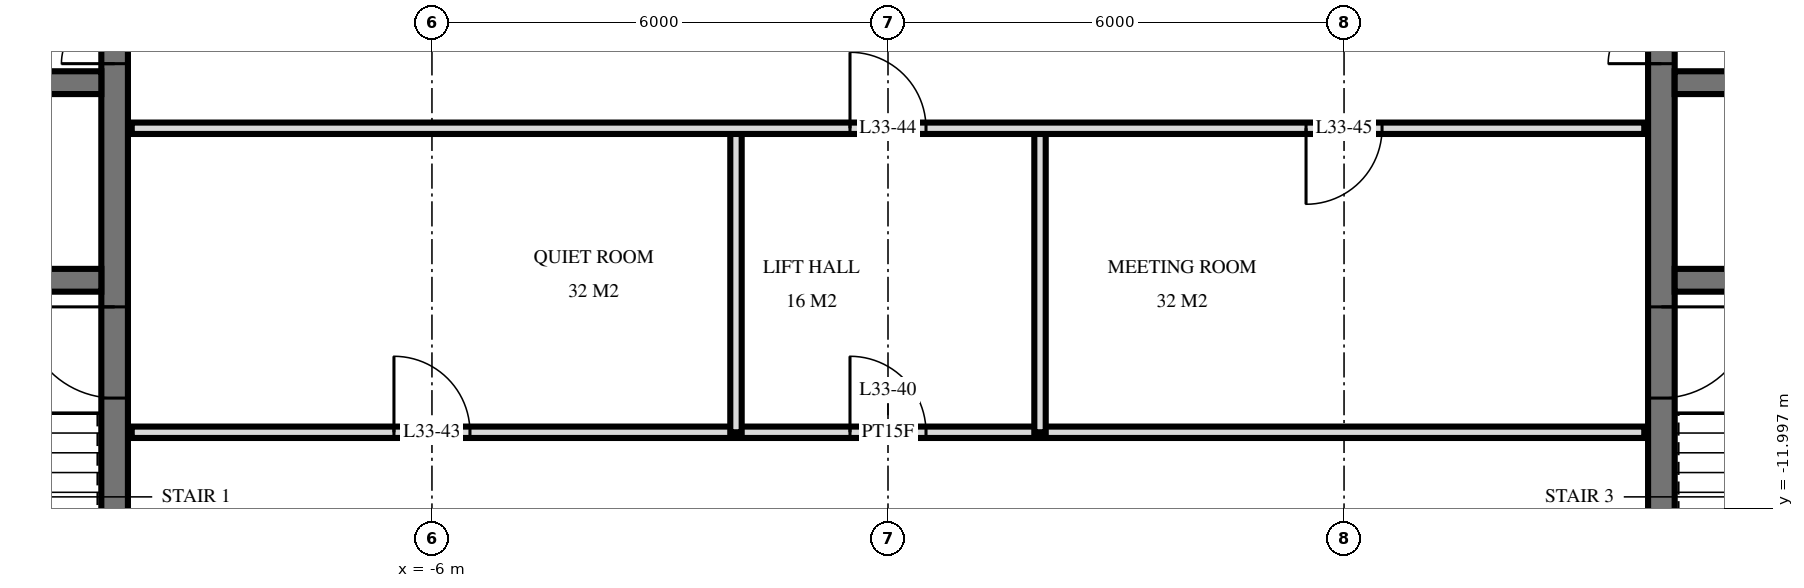
"""IFC4 building model, lengths in metres.
Left out: names, types, materials, properties, quantities, classifications, styles, units other than length and angle.
Written with IfcOpenShell. Run it as: python <this file> out.ifc"""

import sys

from ifc_helpers import new_model, si_unit, direction, frame, frame_2d, origin, place, context, subcontext, project, spatial, rectangle, extrude, element, fill, save


model = new_model("IFC4")
c1 = context("Model", 3, precision=1e-05, world=origin(), true_north=direction((0.0, 1.0)))
c2 = subcontext(c1, "Body", "Model", "MODEL_VIEW")
j1 = project(units=[si_unit("LENGTHUNIT", "METRE"), si_unit("PLANEANGLEUNIT", "RADIAN")], contexts=[c1])
p1 = place(None, origin())
s1 = spatial("IfcSite", under=j1, at=p1, CompositionType="ELEMENT")
p2 = place(p1, origin())
s2 = spatial("IfcBuilding", under=s1, at=p2, CompositionType="ELEMENT")
p3 = place(p2, frame((0.0, 0.0, 130.8)))
s3 = spatial("IfcBuildingStorey", under=s2, at=p3, CompositionType="ELEMENT", Elevation=130.8)
p4 = place(p3, frame((-10.175, -14.55, 0.0), z_axis=(0.0, 0.0, 1.0), x_axis=(0.0, 1.0, 0.0)))
e1 = element("IfcWall", 1, at=p4, inside=s3, PredefinedType="SHEAR", context=c2, shape_type="SweptSolid", body=[
    extrude(rectangle(XDim=14.1, YDim=0.35, at=frame_2d((7.05, 0.0))), origin(), (0.0, 0.0, 1.0), 3.6),
])
p5 = place(p4, frame((8.4, 0.0, 0.0)))
e2 = element("IfcOpeningElement", 2, at=p5, cuts=e1, PredefinedType="OPENING", context=c2, shape_type="SweptSolid", body=[
    extrude(rectangle(XDim=1.4, YDim=2.4, at=frame_2d((0.7, 1.2))), frame((0.0, 0.185, 0.0), z_axis=(0.0, -1.0, 0.0), x_axis=(1.0, 0.0, 0.0)), (0.0, 0.0, 1.0), 0.37),
])
p6 = place(p4, frame((10.0, 0.0, 0.0)))
e3 = element("IfcOpeningElement", 3, at=p6, cuts=e1, PredefinedType="OPENING", context=c2, shape_type="SweptSolid", body=[
    extrude(rectangle(XDim=1.4, YDim=2.4, at=frame_2d((0.7, 1.2))), frame((0.0, 0.185, 0.0), z_axis=(0.0, -1.0, 0.0), x_axis=(1.0, 0.0, 0.0)), (0.0, 0.0, 1.0), 0.37),
])
p7 = place(p4, frame((4.0, 0.0, 0.0)))
e4 = element("IfcOpeningElement", 4, at=p7, cuts=e1, PredefinedType="OPENING", context=c2, shape_type="SweptSolid", body=[
    extrude(rectangle(XDim=1.2, YDim=2.1, at=frame_2d((0.6, 1.05))), frame((0.0, 0.185, 0.0), z_axis=(0.0, -1.0, 0.0), x_axis=(1.0, 0.0, 0.0)), (0.0, 0.0, 1.0), 0.37),
])
p8 = place(p3, frame((-24.05, -6.4, 0.0), z_axis=(0.0, 0.0, 1.0), x_axis=(1.0, 0.0, 0.0)))
e5 = element("IfcWall", 5, at=p8, inside=s3, PredefinedType="SHEAR", context=c2, shape_type="SweptSolid", body=[
    extrude(rectangle(XDim=13.7, YDim=0.3, at=frame_2d((6.85, 0.0))), origin(), (0.0, 0.0, 1.0), 3.6),
])
p9 = place(p8, frame((0.55, 0.0, 0.0)))
e6 = element("IfcOpeningElement", 6, at=p9, cuts=e5, PredefinedType="OPENING", context=c2, shape_type="SweptSolid", body=[
    extrude(rectangle(XDim=1.1, YDim=2.1, at=frame_2d((0.55, 1.05))), frame((0.0, 0.16, 0.0), z_axis=(0.0, -1.0, 0.0), x_axis=(1.0, 0.0, 0.0)), (0.0, 0.0, 1.0), 0.32),
])
p10 = place(p8, frame((5.8, 0.0, 0.0)))
e7 = element("IfcOpeningElement", 7, at=p10, cuts=e5, PredefinedType="OPENING", context=c2, shape_type="SweptSolid", body=[
    extrude(rectangle(XDim=1.1, YDim=2.1, at=frame_2d((0.55, 1.05))), frame((0.0, 0.16, 0.0), z_axis=(0.0, -1.0, 0.0), x_axis=(1.0, 0.0, 0.0)), (0.0, 0.0, 1.0), 0.32),
])
p11 = place(p3, frame((-24.05, -9.0, 0.0), z_axis=(0.0, 0.0, 1.0), x_axis=(1.0, 0.0, 0.0)))
e8 = element("IfcWall", 8, at=p11, inside=s3, PredefinedType="SHEAR", context=c2, shape_type="SweptSolid", body=[
    extrude(rectangle(XDim=13.7, YDim=0.3, at=frame_2d((6.85, 0.0))), origin(), (0.0, 0.0, 1.0), 3.6),
])
p12 = place(p11, frame((8.8, 0.0, 0.0)))
e9 = element("IfcOpeningElement", 9, at=p12, cuts=e8, PredefinedType="OPENING", context=c2, shape_type="SweptSolid", body=[
    extrude(rectangle(XDim=1.1, YDim=2.1, at=frame_2d((0.55, 1.05))), frame((0.0, 0.16, 0.0), z_axis=(0.0, -1.0, 0.0), x_axis=(1.0, 0.0, 0.0)), (0.0, 0.0, 1.0), 0.32),
])
p13 = place(p3, frame((10.175, -14.55, 0.0), z_axis=(0.0, 0.0, 1.0), x_axis=(0.0, 1.0, 0.0)))
e10 = element("IfcWall", 10, at=p13, inside=s3, PredefinedType="SHEAR", context=c2, shape_type="SweptSolid", body=[
    extrude(rectangle(XDim=14.1, YDim=0.35, at=frame_2d((7.05, 0.0))), origin(), (0.0, 0.0, 1.0), 3.6),
])
p14 = place(p13, frame((8.4, 0.0, 0.0)))
e11 = element("IfcOpeningElement", 11, at=p14, cuts=e10, PredefinedType="OPENING", context=c2, shape_type="SweptSolid", body=[
    extrude(rectangle(XDim=1.4, YDim=2.4, at=frame_2d((0.7, 1.2))), frame((0.0, 0.185, 0.0), z_axis=(0.0, -1.0, 0.0), x_axis=(1.0, 0.0, 0.0)), (0.0, 0.0, 1.0), 0.37),
])
p15 = place(p13, frame((10.0, 0.0, 0.0)))
e12 = element("IfcOpeningElement", 12, at=p15, cuts=e10, PredefinedType="OPENING", context=c2, shape_type="SweptSolid", body=[
    extrude(rectangle(XDim=1.4, YDim=2.4, at=frame_2d((0.7, 1.2))), frame((0.0, 0.185, 0.0), z_axis=(0.0, -1.0, 0.0), x_axis=(1.0, 0.0, 0.0)), (0.0, 0.0, 1.0), 0.37),
])
p16 = place(p13, frame((4.0, 0.0, 0.0)))
e13 = element("IfcOpeningElement", 13, at=p16, cuts=e10, PredefinedType="OPENING", context=c2, shape_type="SweptSolid", body=[
    extrude(rectangle(XDim=1.2, YDim=2.1, at=frame_2d((0.6, 1.05))), frame((0.0, 0.185, 0.0), z_axis=(0.0, -1.0, 0.0), x_axis=(1.0, 0.0, 0.0)), (0.0, 0.0, 1.0), 0.37),
])
p17 = place(p3, frame((10.35, -6.4, 0.0), z_axis=(0.0, 0.0, 1.0), x_axis=(1.0, 0.0, 0.0)))
e14 = element("IfcWall", 14, at=p17, inside=s3, PredefinedType="SHEAR", context=c2, shape_type="SweptSolid", body=[
    extrude(rectangle(XDim=13.7, YDim=0.3, at=frame_2d((6.85, 0.0))), origin(), (0.0, 0.0, 1.0), 3.6),
])
p18 = place(p17, frame((12.05, 0.0, 0.0)))
e15 = element("IfcOpeningElement", 15, at=p18, cuts=e14, PredefinedType="OPENING", context=c2, shape_type="SweptSolid", body=[
    extrude(rectangle(XDim=1.1, YDim=2.1, at=frame_2d((0.55, 1.05))), frame((0.0, 0.16, 0.0), z_axis=(0.0, -1.0, 0.0), x_axis=(1.0, 0.0, 0.0)), (0.0, 0.0, 1.0), 0.32),
])
p19 = place(p17, frame((6.8, 0.0, 0.0)))
e16 = element("IfcOpeningElement", 16, at=p19, cuts=e14, PredefinedType="OPENING", context=c2, shape_type="SweptSolid", body=[
    extrude(rectangle(XDim=1.1, YDim=2.1, at=frame_2d((0.55, 1.05))), frame((0.0, 0.16, 0.0), z_axis=(0.0, -1.0, 0.0), x_axis=(1.0, 0.0, 0.0)), (0.0, 0.0, 1.0), 0.32),
])
p20 = place(p3, frame((10.35, -9.0, 0.0), z_axis=(0.0, 0.0, 1.0), x_axis=(1.0, 0.0, 0.0)))
e17 = element("IfcWall", 17, at=p20, inside=s3, PredefinedType="SHEAR", context=c2, shape_type="SweptSolid", body=[
    extrude(rectangle(XDim=13.7, YDim=0.3, at=frame_2d((6.85, 0.0))), origin(), (0.0, 0.0, 1.0), 3.6),
])
p21 = place(p20, frame((3.8, 0.0, 0.0)))
e18 = element("IfcOpeningElement", 18, at=p21, cuts=e17, PredefinedType="OPENING", context=c2, shape_type="SweptSolid", body=[
    extrude(rectangle(XDim=1.1, YDim=2.1, at=frame_2d((0.55, 1.05))), frame((0.0, 0.16, 0.0), z_axis=(0.0, -1.0, 0.0), x_axis=(1.0, 0.0, 0.0)), (0.0, 0.0, 1.0), 0.32),
])
for number, where, z_axis, x_axis in (
    (19, (2.0, -11.0, 0.0), (0.0, 0.0, 1.0), (0.0, 1.0, 0.0)),
    (20, (-2.0, -11.0, 0.0), (0.0, 0.0, 1.0), (0.0, 1.0, 0.0)),
):
    element("IfcWall", number, at=place(p3, frame(where, z_axis=z_axis, x_axis=x_axis)), inside=s3, PredefinedType="PARTITIONING", context=c2, shape_type="SweptSolid", body=[
        extrude(rectangle(XDim=4.0, YDim=0.15, at=frame_2d((2.0, 0.0))), origin(), (0.0, 0.0, 1.0), 3.32),
    ])
p22 = place(p3, frame((-9.95, -11.0, 0.0), z_axis=(0.0, 0.0, 1.0), x_axis=(1.0, 0.0, 0.0)))
e21 = element("IfcWall", 21, at=p22, inside=s3, PredefinedType="PARTITIONING", context=c2, shape_type="SweptSolid", body=[
    extrude(rectangle(XDim=19.9, YDim=0.15, at=frame_2d((9.95, 0.0))), origin(), (0.0, 0.0, 1.0), 3.32),
])
p23 = place(p22, frame((9.45, 0.0, 0.0)))
e22 = element("IfcOpeningElement", 22, at=p23, cuts=e21, PredefinedType="OPENING", context=c2, shape_type="SweptSolid", body=[
    extrude(rectangle(XDim=1.0, YDim=2.1, at=frame_2d((0.5, 1.05))), frame((0.0, 0.085, 0.0), z_axis=(0.0, -1.0, 0.0), x_axis=(1.0, 0.0, 0.0)), (0.0, 0.0, 1.0), 0.17),
])
p24 = place(p22, frame((3.45, 0.0, 0.0)))
e23 = element("IfcOpeningElement", 23, at=p24, cuts=e21, PredefinedType="OPENING", context=c2, shape_type="SweptSolid", body=[
    extrude(rectangle(XDim=1.0, YDim=2.1, at=frame_2d((0.5, 1.05))), frame((0.0, 0.085, 0.0), z_axis=(0.0, -1.0, 0.0), x_axis=(1.0, 0.0, 0.0)), (0.0, 0.0, 1.0), 0.17),
])
p25 = place(p3, frame((-9.95, -7.0, 0.0), z_axis=(0.0, 0.0, 1.0), x_axis=(1.0, 0.0, 0.0)))
e24 = element("IfcWall", 24, at=p25, inside=s3, PredefinedType="PARTITIONING", context=c2, shape_type="SweptSolid", body=[
    extrude(rectangle(XDim=19.9, YDim=0.15, at=frame_2d((9.95, 0.0))), origin(), (0.0, 0.0, 1.0), 3.32),
])
p26 = place(p25, frame((9.45, 0.0, 0.0)))
e25 = element("IfcOpeningElement", 25, at=p26, cuts=e24, PredefinedType="OPENING", context=c2, shape_type="SweptSolid", body=[
    extrude(rectangle(XDim=1.0, YDim=2.1, at=frame_2d((0.5, 1.05))), frame((0.0, 0.085, 0.0), z_axis=(0.0, -1.0, 0.0), x_axis=(1.0, 0.0, 0.0)), (0.0, 0.0, 1.0), 0.17),
])
p27 = place(p25, frame((15.45, 0.0, 0.0)))
e26 = element("IfcOpeningElement", 26, at=p27, cuts=e24, PredefinedType="OPENING", context=c2, shape_type="SweptSolid", body=[
    extrude(rectangle(XDim=1.0, YDim=2.1, at=frame_2d((0.5, 1.05))), frame((0.0, 0.085, 0.0), z_axis=(0.0, -1.0, 0.0), x_axis=(1.0, 0.0, 0.0)), (0.0, 0.0, 1.0), 0.17),
])
p28 = place(p5, origin())
e27 = element("IfcDoor", 27, at=p28, inside=s3, OperationType="DOUBLE_DOOR_SINGLE_SWING", PredefinedType="DOOR", context=c2, shape_type="SweptSolid", body=[
    extrude(rectangle(XDim=1.4, YDim=2.4, at=frame_2d((0.7, 1.2))), frame((0.0, 0.025, 0.0), z_axis=(0.0, -1.0, 0.0), x_axis=(1.0, 0.0, 0.0)), (0.0, 0.0, 1.0), 0.05),
])
fill(e2, e27)
p29 = place(p7, origin())
e28 = element("IfcDoor", 28, at=p29, inside=s3, OperationType="SINGLE_SWING_LEFT", PredefinedType="DOOR", context=c2, shape_type="SweptSolid", body=[
    extrude(rectangle(XDim=1.2, YDim=2.1, at=frame_2d((0.6, 1.05))), frame((0.0, 0.025, 0.0), z_axis=(0.0, -1.0, 0.0), x_axis=(1.0, 0.0, 0.0)), (0.0, 0.0, 1.0), 0.05),
])
fill(e4, e28)
p30 = place(p14, origin())
e29 = element("IfcDoor", 29, at=p30, inside=s3, OperationType="DOUBLE_DOOR_SINGLE_SWING", PredefinedType="DOOR", context=c2, shape_type="SweptSolid", body=[
    extrude(rectangle(XDim=1.4, YDim=2.4, at=frame_2d((0.7, 1.2))), frame((0.0, 0.025, 0.0), z_axis=(0.0, -1.0, 0.0), x_axis=(1.0, 0.0, 0.0)), (0.0, 0.0, 1.0), 0.05),
])
fill(e11, e29)
p31 = place(p16, frame((0.6, 0.0, 0.0), z_axis=(0.0, 0.0, 1.0), x_axis=(-1.0, 0.0, 0.0)))
e30 = element("IfcDoor", 30, at=p31, inside=s3, OperationType="SINGLE_SWING_RIGHT", PredefinedType="DOOR", context=c2, shape_type="SweptSolid", body=[
    extrude(rectangle(XDim=1.2, YDim=2.1, at=frame_2d((0.0, 1.05))), frame((0.0, -0.025, 0.0), z_axis=(0.0, 1.0, 0.0), x_axis=(-1.0, 0.0, 0.0)), (0.0, 0.0, 1.0), 0.05),
])
fill(e13, e30)
p32 = place(p23, origin())
e31 = element("IfcDoor", 31, at=p32, inside=s3, OperationType="SINGLE_SWING_RIGHT", PredefinedType="DOOR", context=c2, shape_type="SweptSolid", body=[
    extrude(rectangle(XDim=1.0, YDim=2.1, at=frame_2d((0.5, 1.05))), frame((0.0, 0.025, 0.0), z_axis=(0.0, -1.0, 0.0), x_axis=(1.0, 0.0, 0.0)), (0.0, 0.0, 1.0), 0.05),
])
fill(e22, e31)
p33 = place(p24, origin())
e32 = element("IfcDoor", 32, at=p33, inside=s3, OperationType="SINGLE_SWING_RIGHT", PredefinedType="DOOR", context=c2, shape_type="SweptSolid", body=[
    extrude(rectangle(XDim=1.0, YDim=2.1, at=frame_2d((0.5, 1.05))), frame((0.0, 0.025, 0.0), z_axis=(0.0, -1.0, 0.0), x_axis=(1.0, 0.0, 0.0)), (0.0, 0.0, 1.0), 0.05),
])
fill(e23, e32)
p34 = place(p26, origin())
e33 = element("IfcDoor", 33, at=p34, inside=s3, OperationType="SINGLE_SWING_RIGHT", PredefinedType="DOOR", context=c2, shape_type="SweptSolid", body=[
    extrude(rectangle(XDim=1.0, YDim=2.1, at=frame_2d((0.5, 1.05))), frame((0.0, 0.025, 0.0), z_axis=(0.0, -1.0, 0.0), x_axis=(1.0, 0.0, 0.0)), (0.0, 0.0, 1.0), 0.05),
])
fill(e25, e33)
p35 = place(p27, frame((0.5, 0.0, 0.0), z_axis=(0.0, 0.0, 1.0), x_axis=(-1.0, 0.0, 0.0)))
e34 = element("IfcDoor", 34, at=p35, inside=s3, OperationType="SINGLE_SWING_LEFT", PredefinedType="DOOR", context=c2, shape_type="SweptSolid", body=[
    extrude(rectangle(XDim=1.0, YDim=2.1, at=frame_2d((0.0, 1.05))), frame((0.0, -0.025, 0.0), z_axis=(0.0, 1.0, 0.0), x_axis=(-1.0, 0.0, 0.0)), (0.0, 0.0, 1.0), 0.05),
])
fill(e26, e34)
save(model, sys.argv[1])
